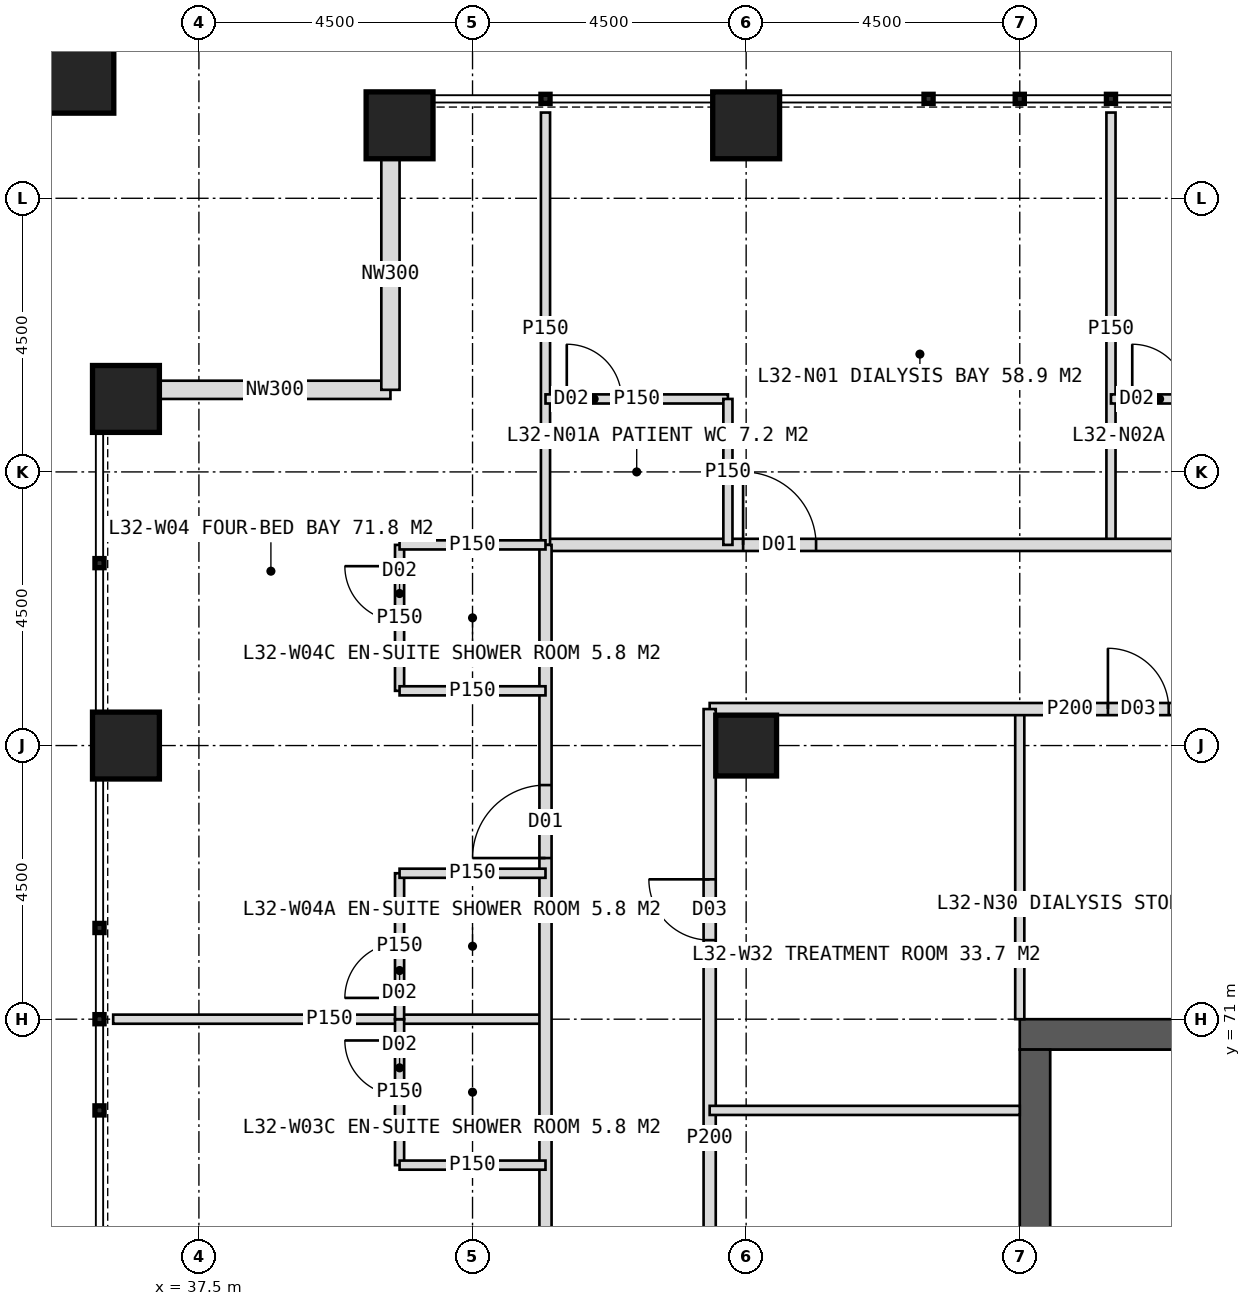
"""IFC4 building model, lengths in metres.
Left out: names, types, materials, properties, quantities, classifications, styles, units other than length and angle.
Written with IfcOpenShell. Run it as: python <this file> out.ifc"""

import sys

from ifc_helpers import new_model, si_unit, direction, frame, frame_2d, origin, origin_2d, place, context, subcontext, project, spatial, rectangle, hollow_rectangle, extrude, element, fill, save


model = new_model("IFC4")
c1 = context("Model", 3, precision=1e-05, world=origin(), true_north=direction((0.0, 1.0)))
c2 = subcontext(c1, "Body", "Model", "MODEL_VIEW")
j1 = project(units=[si_unit("LENGTHUNIT", "METRE"), si_unit("PLANEANGLEUNIT", "RADIAN")], contexts=[c1])
p1 = place(None, origin())
s1 = spatial("IfcSite", under=j1, at=p1, CompositionType="ELEMENT")
p2 = place(p1, origin())
s2 = spatial("IfcBuilding", under=s1, at=p2, CompositionType="ELEMENT")
p3 = place(p2, frame((0.0, 0.0, 136.0)))
s3 = spatial("IfcBuildingStorey", under=s2, at=p3, CompositionType="ELEMENT", Elevation=136.0)
p4 = place(p3, frame((51.0, 70.75, 0.0), z_axis=(0.0, 0.0, 1.0), x_axis=(1.0, 0.0, 0.0)))
e1 = element("IfcWall", 1, at=p4, inside=s3, PredefinedType="SHEAR", context=c2, shape_type="SweptSolid", body=[
    extrude(rectangle(XDim=18.0, YDim=0.5, at=frame_2d((9.0, 0.0))), origin(), (0.0, 0.0, 1.0), 4.0),
])
p5 = place(p4, frame((8.1, 0.0, 0.0)))
e2 = element("IfcOpeningElement", 2, at=p5, cuts=e1, PredefinedType="OPENING", context=c2, shape_type="SweptSolid", body=[
    extrude(rectangle(XDim=1.8, YDim=2.2, at=frame_2d((0.9, 1.1))), frame((0.0, 0.26, 0.0), z_axis=(0.0, -1.0, 0.0), x_axis=(1.0, 0.0, 0.0)), (0.0, 0.0, 1.0), 0.52),
])
p6 = place(p3, frame((51.25, 53.5, 0.0), z_axis=(0.0, 0.0, 1.0), x_axis=(0.0, 1.0, 0.0)))
e3 = element("IfcWall", 3, at=p6, inside=s3, PredefinedType="SHEAR", context=c2, shape_type="SweptSolid", body=[
    extrude(rectangle(XDim=17.0, YDim=0.5, at=frame_2d((8.5, 0.0))), origin(), (0.0, 0.0, 1.0), 4.0),
])
p7 = place(p6, frame((6.0, 0.0, 0.0)))
e4 = element("IfcOpeningElement", 4, at=p7, cuts=e3, PredefinedType="OPENING", context=c2, shape_type="SweptSolid", body=[
    extrude(rectangle(XDim=1.5, YDim=2.2, at=frame_2d((0.75, 1.1))), frame((0.0, 0.26, 0.0), z_axis=(0.0, -1.0, 0.0), x_axis=(1.0, 0.0, 0.0)), (0.0, 0.0, 1.0), 0.52),
])
p8 = place(p3, frame((46.5, 75.5, 0.0), z_axis=(0.0, 0.0, 1.0), x_axis=(1.0, 0.0, 0.0)))
e5 = element("IfcColumn", 5, at=p8, inside=s3, PredefinedType="COLUMN", context=c2, shape_type="SweptSolid", body=[
    extrude(hollow_rectangle(XDim=1.0, YDim=1.0, WallThickness=0.1, at=origin_2d()), origin(), (0.0, 0.0, 1.0), 4.0),
])
for number, where, z_axis, x_axis in (
    (6, (40.8, 85.7, 0.0), (0.0, 0.0, 1.0), (1.0, 0.0, 0.0)),
    (7, (46.5, 85.7, 0.0), (0.0, 0.0, 1.0), (1.0, 0.0, 0.0)),
    (8, (36.3, 75.5, 0.0), (0.0, 0.0, 1.0), (1.0, 0.0, 0.0)),
    (9, (36.3, 81.2, 0.0), (0.0, 0.0, 1.0), (1.0, 0.0, 0.0)),
):
    element("IfcColumn", number, at=place(p3, frame(where, z_axis=z_axis, x_axis=x_axis)), inside=s3, PredefinedType="COLUMN", context=c2, shape_type="SweptSolid", body=[
        extrude(hollow_rectangle(XDim=1.1, YDim=1.1, WallThickness=0.1, at=origin_2d()), origin(), (0.0, 0.0, 1.0), 4.0),
    ])
p9 = place(p3, frame((35.4, 86.6, 0.0), z_axis=(0.0, 0.0, 1.0), x_axis=(1.0, 0.0, 0.0)))
e10 = element("IfcColumn", 10, at=p9, inside=s3, PredefinedType="COLUMN", context=c2, shape_type="SweptSolid", body=[
    extrude(hollow_rectangle(XDim=1.4, YDim=1.4, WallThickness=0.08, at=origin_2d()), origin(), (0.0, 0.0, 1.0), 4.0),
])
for number, where, z_axis, x_axis in (
    (11, (36.85, 81.35, 0.0), (0.0, 0.0, 1.0), (1.0, 0.0, 0.0)),
    (12, (40.65, 81.35, 0.0), (0.0, 0.0, 1.0), (0.0, 1.0, 0.0)),
):
    element("IfcWall", number, at=place(p3, frame(where, z_axis=z_axis, x_axis=x_axis)), inside=s3, PredefinedType="ELEMENTEDWALL", context=c2, shape_type="SweptSolid", body=[
        extrude(rectangle(XDim=3.8, YDim=0.3, at=frame_2d((1.9, 0.0))), origin(), (0.0, 0.0, 1.0), 4.0),
    ])
p10 = place(p3, frame((52.5, 78.8, 0.0), z_axis=(0.0, 0.0, 1.0), x_axis=(0.0, 1.0, 0.0)))
e13 = element("IfcWall", 13, at=p10, inside=s3, PredefinedType="PARTITIONING", context=c2, shape_type="SweptSolid", body=[
    extrude(rectangle(XDim=7.11, YDim=0.15, at=frame_2d((3.555, 0.0))), origin(), (0.0, 0.0, 1.0), 3.75),
])
p11 = place(p3, frame((43.2, 78.8, 0.0), z_axis=(0.0, 0.0, 1.0), x_axis=(1.0, 0.0, 0.0)))
e14 = element("IfcWall", 14, at=p11, inside=s3, PredefinedType="PARTITIONING", context=c2, shape_type="SweptSolid", body=[
    extrude(rectangle(XDim=33.6, YDim=0.2, at=frame_2d((16.8, 0.0))), origin(), (0.0, 0.0, 1.0), 3.75),
])
p12 = place(p11, frame((3.25, 0.0, 0.0)))
e15 = element("IfcOpeningElement", 15, at=p12, cuts=e14, PredefinedType="OPENING", context=c2, shape_type="SweptSolid", body=[
    extrude(rectangle(XDim=1.2, YDim=2.2, at=frame_2d((0.6, 1.1))), frame((0.0, 0.11, 0.0), z_axis=(0.0, -1.0, 0.0), x_axis=(1.0, 0.0, 0.0)), (0.0, 0.0, 1.0), 0.22),
])
p13 = place(p11, frame((12.55, 0.0, 0.0)))
e16 = element("IfcOpeningElement", 16, at=p13, cuts=e14, PredefinedType="OPENING", context=c2, shape_type="SweptSolid", body=[
    extrude(rectangle(XDim=1.2, YDim=2.2, at=frame_2d((0.6, 1.1))), frame((0.0, 0.11, 0.0), z_axis=(0.0, -1.0, 0.0), x_axis=(1.0, 0.0, 0.0)), (0.0, 0.0, 1.0), 0.22),
])
p14 = place(p11, frame((26.95, 0.0, 0.0)))
e17 = element("IfcOpeningElement", 17, at=p14, cuts=e14, PredefinedType="OPENING", context=c2, shape_type="SweptSolid", body=[
    extrude(rectangle(XDim=1.2, YDim=2.2, at=frame_2d((0.6, 1.1))), frame((0.0, 0.11, 0.0), z_axis=(0.0, -1.0, 0.0), x_axis=(1.0, 0.0, 0.0)), (0.0, 0.0, 1.0), 0.22),
])
p15 = place(p3, frame((43.2, 78.8, 0.0), z_axis=(0.0, 0.0, 1.0), x_axis=(0.0, 1.0, 0.0)))
e18 = element("IfcWall", 18, at=p15, inside=s3, PredefinedType="PARTITIONING", context=c2, shape_type="SweptSolid", body=[
    extrude(rectangle(XDim=7.11, YDim=0.15, at=frame_2d((3.555, 0.0))), origin(), (0.0, 0.0, 1.0), 3.75),
])
p16 = place(p3, frame((43.2, 81.2, 0.0), z_axis=(0.0, 0.0, 1.0), x_axis=(1.0, 0.0, 0.0)))
e19 = element("IfcWall", 19, at=p16, inside=s3, PredefinedType="PARTITIONING", context=c2, shape_type="SweptSolid", body=[
    extrude(rectangle(XDim=3.0, YDim=0.15, at=frame_2d((1.5, 0.0))), origin(), (0.0, 0.0, 1.0), 2.997),
])
p17 = place(p16, frame((0.35, 0.0, 0.0)))
e20 = element("IfcOpeningElement", 20, at=p17, cuts=e19, PredefinedType="OPENING", context=c2, shape_type="SweptSolid", body=[
    extrude(rectangle(XDim=0.9, YDim=2.1, at=frame_2d((0.45, 1.05))), frame((0.0, 0.085, 0.0), z_axis=(0.0, -1.0, 0.0), x_axis=(1.0, 0.0, 0.0)), (0.0, 0.0, 1.0), 0.17),
])
p18 = place(p3, frame((46.2, 78.8, 0.0), z_axis=(0.0, 0.0, 1.0), x_axis=(0.0, 1.0, 0.0)))
e21 = element("IfcWall", 21, at=p18, inside=s3, PredefinedType="PARTITIONING", context=c2, shape_type="SweptSolid", body=[
    extrude(rectangle(XDim=2.4, YDim=0.15, at=frame_2d((1.2, 0.0))), origin(), (0.0, 0.0, 1.0), 3.75),
])
p19 = place(p3, frame((52.5, 81.2, 0.0), z_axis=(0.0, 0.0, 1.0), x_axis=(1.0, 0.0, 0.0)))
e22 = element("IfcWall", 22, at=p19, inside=s3, PredefinedType="PARTITIONING", context=c2, shape_type="SweptSolid", body=[
    extrude(rectangle(XDim=3.0, YDim=0.15, at=frame_2d((1.5, 0.0))), origin(), (0.0, 0.0, 1.0), 3.75),
])
p20 = place(p19, frame((0.35, 0.0, 0.0)))
e23 = element("IfcOpeningElement", 23, at=p20, cuts=e22, PredefinedType="OPENING", context=c2, shape_type="SweptSolid", body=[
    extrude(rectangle(XDim=0.9, YDim=2.1, at=frame_2d((0.45, 1.05))), frame((0.0, 0.085, 0.0), z_axis=(0.0, -1.0, 0.0), x_axis=(1.0, 0.0, 0.0)), (0.0, 0.0, 1.0), 0.17),
])
p21 = place(p3, frame((51.0, 71.0, 0.0), z_axis=(0.0, 0.0, 1.0), x_axis=(0.0, 1.0, 0.0)))
e24 = element("IfcWall", 24, at=p21, inside=s3, PredefinedType="PARTITIONING", context=c2, shape_type="SweptSolid", body=[
    extrude(rectangle(XDim=5.1, YDim=0.15, at=frame_2d((2.55, 0.0))), origin(), (0.0, 0.0, 1.0), 3.75),
])
p22 = place(p3, frame((45.9, 76.1, 0.0), z_axis=(0.0, 0.0, 1.0), x_axis=(1.0, 0.0, 0.0)))
e25 = element("IfcWall", 25, at=p22, inside=s3, PredefinedType="PARTITIONING", context=c2, shape_type="SweptSolid", body=[
    extrude(rectangle(XDim=11.85, YDim=0.2, at=frame_2d((5.925, 0.0))), origin(), (0.0, 0.0, 1.0), 3.75),
])
p23 = place(p22, frame((6.55, 0.0, 0.0)))
e26 = element("IfcOpeningElement", 26, at=p23, cuts=e25, PredefinedType="OPENING", context=c2, shape_type="SweptSolid", body=[
    extrude(rectangle(XDim=1.0, YDim=2.1, at=frame_2d((0.5, 1.05))), frame((0.0, 0.11, 0.0), z_axis=(0.0, -1.0, 0.0), x_axis=(1.0, 0.0, 0.0)), (0.0, 0.0, 1.0), 0.22),
])
p24 = place(p3, frame((43.2, 71.0, 0.0), z_axis=(0.0, 0.0, 1.0), x_axis=(-1.0, 0.0, 0.0)))
e27 = element("IfcWall", 27, at=p24, inside=s3, PredefinedType="PARTITIONING", context=c2, shape_type="SweptSolid", body=[
    extrude(rectangle(XDim=7.11, YDim=0.15, at=frame_2d((3.555, 0.0))), origin(), (0.0, 0.0, 1.0), 3.75),
])
p25 = place(p3, frame((43.2, 45.2, 0.0), z_axis=(0.0, 0.0, 1.0), x_axis=(0.0, 1.0, 0.0)))
e28 = element("IfcWall", 28, at=p25, inside=s3, PredefinedType="PARTITIONING", context=c2, shape_type="SweptSolid", body=[
    extrude(rectangle(XDim=33.6, YDim=0.2, at=frame_2d((16.8, 0.0))), origin(), (0.0, 0.0, 1.0), 3.75),
])
p26 = place(p25, frame((2.65, 0.0, 0.0)))
e29 = element("IfcOpeningElement", 29, at=p26, cuts=e28, PredefinedType="OPENING", context=c2, shape_type="SweptSolid", body=[
    extrude(rectangle(XDim=1.2, YDim=2.2, at=frame_2d((0.6, 1.1))), frame((0.0, 0.11, 0.0), z_axis=(0.0, -1.0, 0.0), x_axis=(1.0, 0.0, 0.0)), (0.0, 0.0, 1.0), 0.22),
])
p27 = place(p25, frame((8.95, 0.0, 0.0)))
e30 = element("IfcOpeningElement", 30, at=p27, cuts=e28, PredefinedType="OPENING", context=c2, shape_type="SweptSolid", body=[
    extrude(rectangle(XDim=1.2, YDim=2.2, at=frame_2d((0.6, 1.1))), frame((0.0, 0.11, 0.0), z_axis=(0.0, -1.0, 0.0), x_axis=(1.0, 0.0, 0.0)), (0.0, 0.0, 1.0), 0.22),
])
p28 = place(p25, frame((19.45, 0.0, 0.0)))
e31 = element("IfcOpeningElement", 31, at=p28, cuts=e28, PredefinedType="OPENING", context=c2, shape_type="SweptSolid", body=[
    extrude(rectangle(XDim=1.2, YDim=2.2, at=frame_2d((0.6, 1.1))), frame((0.0, 0.11, 0.0), z_axis=(0.0, -1.0, 0.0), x_axis=(1.0, 0.0, 0.0)), (0.0, 0.0, 1.0), 0.22),
])
p29 = place(p25, frame((28.45, 0.0, 0.0)))
e32 = element("IfcOpeningElement", 32, at=p29, cuts=e28, PredefinedType="OPENING", context=c2, shape_type="SweptSolid", body=[
    extrude(rectangle(XDim=1.2, YDim=2.2, at=frame_2d((0.6, 1.1))), frame((0.0, 0.11, 0.0), z_axis=(0.0, -1.0, 0.0), x_axis=(1.0, 0.0, 0.0)), (0.0, 0.0, 1.0), 0.22),
])
p30 = place(p3, frame((40.8, 68.6, 0.0), z_axis=(0.0, 0.0, 1.0), x_axis=(0.0, 1.0, 0.0)))
e33 = element("IfcWall", 33, at=p30, inside=s3, PredefinedType="PARTITIONING", context=c2, shape_type="SweptSolid", body=[
    extrude(rectangle(XDim=2.4, YDim=0.15, at=frame_2d((1.2, 0.0))), origin(), (0.0, 0.0, 1.0), 3.75),
])
p31 = place(p30, frame((1.15, 0.0, 0.0)))
e34 = element("IfcOpeningElement", 34, at=p31, cuts=e33, PredefinedType="OPENING", context=c2, shape_type="SweptSolid", body=[
    extrude(rectangle(XDim=0.9, YDim=2.1, at=frame_2d((0.45, 1.05))), frame((0.0, 0.085, 0.0), z_axis=(0.0, -1.0, 0.0), x_axis=(1.0, 0.0, 0.0)), (0.0, 0.0, 1.0), 0.17),
])
p32 = place(p3, frame((43.2, 68.6, 0.0), z_axis=(0.0, 0.0, 1.0), x_axis=(-1.0, 0.0, 0.0)))
e35 = element("IfcWall", 35, at=p32, inside=s3, PredefinedType="PARTITIONING", context=c2, shape_type="SweptSolid", body=[
    extrude(rectangle(XDim=2.4, YDim=0.15, at=frame_2d((1.2, 0.0))), origin(), (0.0, 0.0, 1.0), 3.75),
])
p33 = place(p3, frame((40.8, 71.0, 0.0), z_axis=(0.0, 0.0, 1.0), x_axis=(0.0, 1.0, 0.0)))
e36 = element("IfcWall", 36, at=p33, inside=s3, PredefinedType="PARTITIONING", context=c2, shape_type="SweptSolid", body=[
    extrude(rectangle(XDim=2.4, YDim=0.15, at=frame_2d((1.2, 0.0))), origin(), (0.0, 0.0, 1.0), 3.75),
])
p34 = place(p33, frame((0.35, 0.0, 0.0)))
e37 = element("IfcOpeningElement", 37, at=p34, cuts=e36, PredefinedType="OPENING", context=c2, shape_type="SweptSolid", body=[
    extrude(rectangle(XDim=0.9, YDim=2.1, at=frame_2d((0.45, 1.05))), frame((0.0, 0.085, 0.0), z_axis=(0.0, -1.0, 0.0), x_axis=(1.0, 0.0, 0.0)), (0.0, 0.0, 1.0), 0.17),
])
p35 = place(p3, frame((43.2, 73.4, 0.0), z_axis=(0.0, 0.0, 1.0), x_axis=(-1.0, 0.0, 0.0)))
e38 = element("IfcWall", 38, at=p35, inside=s3, PredefinedType="PARTITIONING", context=c2, shape_type="SweptSolid", body=[
    extrude(rectangle(XDim=2.4, YDim=0.15, at=frame_2d((1.2, 0.0))), origin(), (0.0, 0.0, 1.0), 3.75),
])
p36 = place(p3, frame((40.8, 76.4, 0.0), z_axis=(0.0, 0.0, 1.0), x_axis=(0.0, 1.0, 0.0)))
e39 = element("IfcWall", 39, at=p36, inside=s3, PredefinedType="PARTITIONING", context=c2, shape_type="SweptSolid", body=[
    extrude(rectangle(XDim=2.4, YDim=0.15, at=frame_2d((1.2, 0.0))), origin(), (0.0, 0.0, 1.0), 2.997),
])
p37 = place(p36, frame((1.15, 0.0, 0.0)))
e40 = element("IfcOpeningElement", 40, at=p37, cuts=e39, PredefinedType="OPENING", context=c2, shape_type="SweptSolid", body=[
    extrude(rectangle(XDim=0.9, YDim=2.1, at=frame_2d((0.45, 1.05))), frame((0.0, 0.085, 0.0), z_axis=(0.0, -1.0, 0.0), x_axis=(1.0, 0.0, 0.0)), (0.0, 0.0, 1.0), 0.17),
])
for number, where, z_axis, x_axis in (
    (41, (43.2, 76.4, 0.0), (0.0, 0.0, 1.0), (-1.0, 0.0, 0.0)),
    (42, (43.2, 78.8, 0.0), (0.0, 0.0, 1.0), (-1.0, 0.0, 0.0)),
):
    element("IfcWall", number, at=place(p3, frame(where, z_axis=z_axis, x_axis=x_axis)), inside=s3, PredefinedType="PARTITIONING", context=c2, shape_type="SweptSolid", body=[
        extrude(rectangle(XDim=2.4, YDim=0.15, at=frame_2d((1.2, 0.0))), origin(), (0.0, 0.0, 1.0), 3.75),
    ])
p38 = place(p3, frame((45.9, 62.0, 0.0), z_axis=(0.0, 0.0, 1.0), x_axis=(0.0, 1.0, 0.0)))
e43 = element("IfcWall", 43, at=p38, inside=s3, PredefinedType="PARTITIONING", context=c2, shape_type="SweptSolid", body=[
    extrude(rectangle(XDim=14.1, YDim=0.2, at=frame_2d((7.05, 0.0))), origin(), (0.0, 0.0, 1.0), 3.75),
])
p39 = place(p38, frame((1.45, 0.0, 0.0)))
e44 = element("IfcOpeningElement", 44, at=p39, cuts=e43, PredefinedType="OPENING", context=c2, shape_type="SweptSolid", body=[
    extrude(rectangle(XDim=1.0, YDim=2.1, at=frame_2d((0.5, 1.05))), frame((0.0, 0.11, 0.0), z_axis=(0.0, -1.0, 0.0), x_axis=(1.0, 0.0, 0.0)), (0.0, 0.0, 1.0), 0.22),
])
p40 = place(p38, frame((10.3, 0.0, 0.0)))
e45 = element("IfcOpeningElement", 45, at=p40, cuts=e43, PredefinedType="OPENING", context=c2, shape_type="SweptSolid", body=[
    extrude(rectangle(XDim=1.0, YDim=2.1, at=frame_2d((0.5, 1.05))), frame((0.0, 0.11, 0.0), z_axis=(0.0, -1.0, 0.0), x_axis=(1.0, 0.0, 0.0)), (0.0, 0.0, 1.0), 0.22),
])
p41 = place(p3, frame((51.0, 69.5, 0.0), z_axis=(0.0, 0.0, 1.0), x_axis=(-1.0, 0.0, 0.0)))
e46 = element("IfcWall", 46, at=p41, inside=s3, PredefinedType="PARTITIONING", context=c2, shape_type="SweptSolid", body=[
    extrude(rectangle(XDim=5.1, YDim=0.15, at=frame_2d((2.55, 0.0))), origin(), (0.0, 0.0, 1.0), 3.75),
])
p42 = place(p12, origin())
e47 = element("IfcDoor", 47, at=p42, inside=s3, OperationType="SINGLE_SWING_LEFT", PredefinedType="DOOR", context=c2, shape_type="SweptSolid", body=[
    extrude(rectangle(XDim=1.2, YDim=2.2, at=frame_2d((0.6, 1.1))), frame((0.0, 0.025, 0.0), z_axis=(0.0, -1.0, 0.0), x_axis=(1.0, 0.0, 0.0)), (0.0, 0.0, 1.0), 0.05),
])
fill(e15, e47)
p43 = place(p17, origin())
e48 = element("IfcDoor", 48, at=p43, inside=s3, OperationType="SINGLE_SWING_LEFT", PredefinedType="DOOR", context=c2, shape_type="SweptSolid", body=[
    extrude(rectangle(XDim=0.9, YDim=2.1, at=frame_2d((0.45, 1.05))), frame((0.0, 0.025, 0.0), z_axis=(0.0, -1.0, 0.0), x_axis=(1.0, 0.0, 0.0)), (0.0, 0.0, 1.0), 0.05),
])
fill(e20, e48)
p44 = place(p20, origin())
e49 = element("IfcDoor", 49, at=p44, inside=s3, OperationType="SINGLE_SWING_LEFT", PredefinedType="DOOR", context=c2, shape_type="SweptSolid", body=[
    extrude(rectangle(XDim=0.9, YDim=2.1, at=frame_2d((0.45, 1.05))), frame((0.0, 0.025, 0.0), z_axis=(0.0, -1.0, 0.0), x_axis=(1.0, 0.0, 0.0)), (0.0, 0.0, 1.0), 0.05),
])
fill(e23, e49)
p45 = place(p23, origin())
e50 = element("IfcDoor", 50, at=p45, inside=s3, OperationType="SINGLE_SWING_LEFT", PredefinedType="DOOR", context=c2, shape_type="SweptSolid", body=[
    extrude(rectangle(XDim=1.0, YDim=2.1, at=frame_2d((0.5, 1.05))), frame((0.0, 0.025, 0.0), z_axis=(0.0, -1.0, 0.0), x_axis=(1.0, 0.0, 0.0)), (0.0, 0.0, 1.0), 0.05),
])
fill(e26, e50)
p46 = place(p31, origin())
e51 = element("IfcDoor", 51, at=p46, inside=s3, OperationType="SINGLE_SWING_RIGHT", PredefinedType="DOOR", context=c2, shape_type="SweptSolid", body=[
    extrude(rectangle(XDim=0.9, YDim=2.1, at=frame_2d((0.45, 1.05))), frame((0.0, 0.025, 0.0), z_axis=(0.0, -1.0, 0.0), x_axis=(1.0, 0.0, 0.0)), (0.0, 0.0, 1.0), 0.05),
])
fill(e34, e51)
p47 = place(p29, origin())
e52 = element("IfcDoor", 52, at=p47, inside=s3, OperationType="SINGLE_SWING_LEFT", PredefinedType="DOOR", context=c2, shape_type="SweptSolid", body=[
    extrude(rectangle(XDim=1.2, YDim=2.2, at=frame_2d((0.6, 1.1))), frame((0.0, 0.025, 0.0), z_axis=(0.0, -1.0, 0.0), x_axis=(1.0, 0.0, 0.0)), (0.0, 0.0, 1.0), 0.05),
])
fill(e32, e52)
p48 = place(p34, origin())
e53 = element("IfcDoor", 53, at=p48, inside=s3, OperationType="SINGLE_SWING_LEFT", PredefinedType="DOOR", context=c2, shape_type="SweptSolid", body=[
    extrude(rectangle(XDim=0.9, YDim=2.1, at=frame_2d((0.45, 1.05))), frame((0.0, 0.025, 0.0), z_axis=(0.0, -1.0, 0.0), x_axis=(1.0, 0.0, 0.0)), (0.0, 0.0, 1.0), 0.05),
])
fill(e37, e53)
p49 = place(p37, origin())
e54 = element("IfcDoor", 54, at=p49, inside=s3, OperationType="SINGLE_SWING_RIGHT", PredefinedType="DOOR", context=c2, shape_type="SweptSolid", body=[
    extrude(rectangle(XDim=0.9, YDim=2.1, at=frame_2d((0.45, 1.05))), frame((0.0, 0.025, 0.0), z_axis=(0.0, -1.0, 0.0), x_axis=(1.0, 0.0, 0.0)), (0.0, 0.0, 1.0), 0.05),
])
fill(e40, e54)
p50 = place(p40, origin())
e55 = element("IfcDoor", 55, at=p50, inside=s3, OperationType="SINGLE_SWING_RIGHT", PredefinedType="DOOR", context=c2, shape_type="SweptSolid", body=[
    extrude(rectangle(XDim=1.0, YDim=2.1, at=frame_2d((0.5, 1.05))), frame((0.0, 0.025, 0.0), z_axis=(0.0, -1.0, 0.0), x_axis=(1.0, 0.0, 0.0)), (0.0, 0.0, 1.0), 0.05),
])
fill(e45, e55)
save(model, sys.argv[1])
